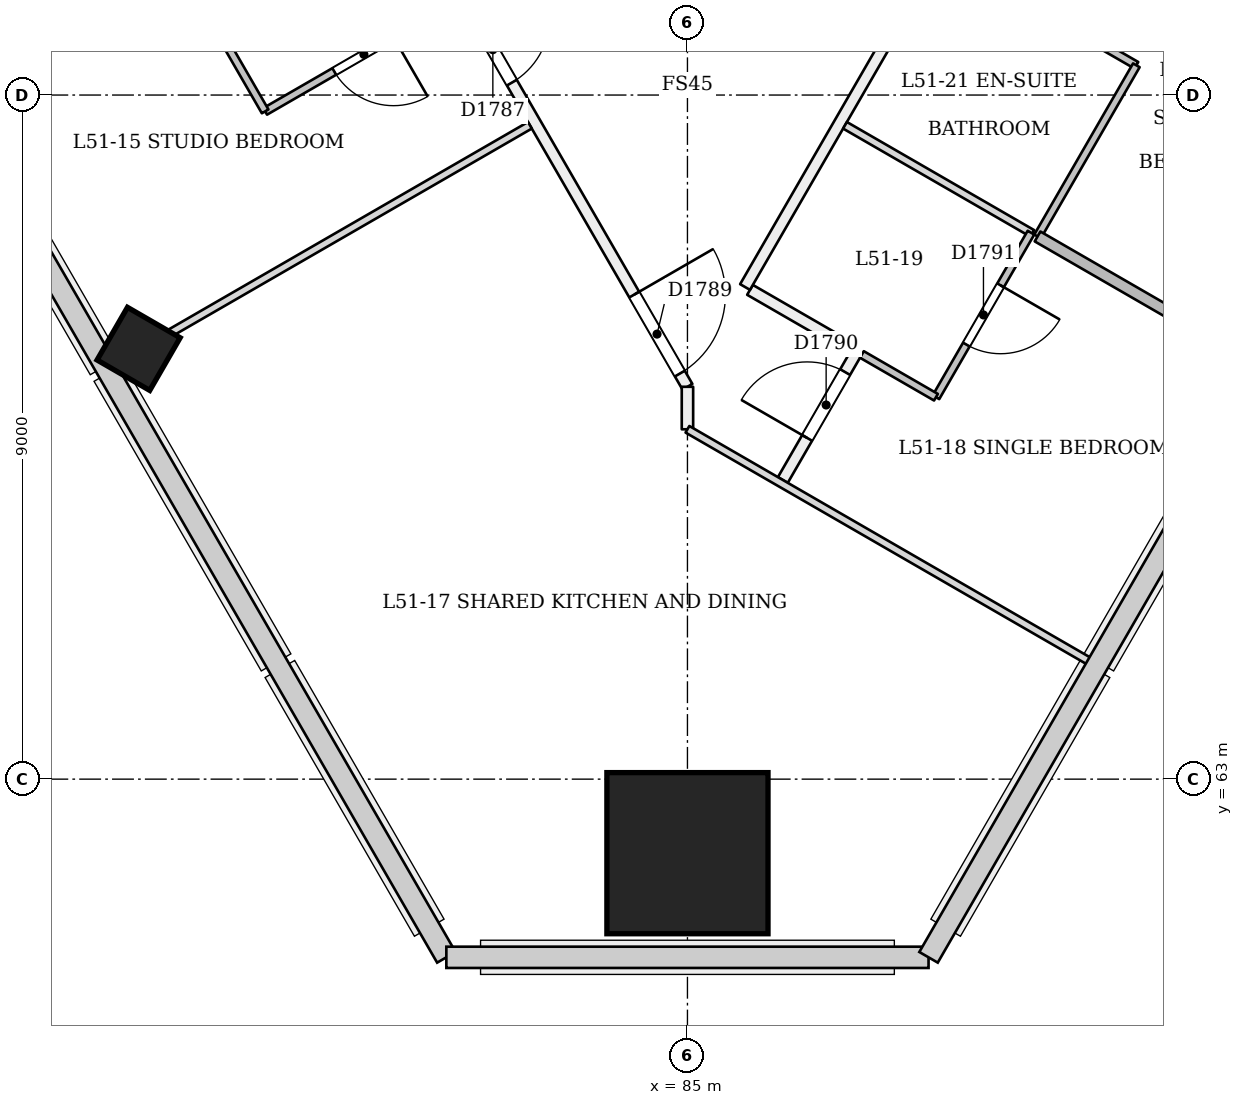
"""IFC4 building model, lengths in metres.
Left out: names, types, materials, properties, quantities, classifications, styles, units other than length and angle.
Written with IfcOpenShell. Run it as: python <this file> out.ifc"""

import sys

from ifc_helpers import new_model, si_unit, direction, frame, frame_2d, origin, origin_2d, place, context, subcontext, project, spatial, rectangle, extrude, element, fill, save


model = new_model("IFC4")
c1 = context("Model", 3, precision=1e-05, world=origin(), true_north=direction((0.0, 1.0)))
c2 = subcontext(c1, "Body", "Model", "MODEL_VIEW")
j1 = project(units=[si_unit("LENGTHUNIT", "METRE"), si_unit("PLANEANGLEUNIT", "RADIAN")], contexts=[c1])
p1 = place(None, origin())
s1 = spatial("IfcSite", under=j1, at=p1, CompositionType="ELEMENT")
p2 = place(p1, origin())
s2 = spatial("IfcBuilding", under=s1, at=p2, CompositionType="ELEMENT")
p3 = place(p2, frame((0.0, 0.0, 198.0)))
s3 = spatial("IfcBuildingStorey", under=s2, at=p3, CompositionType="ELEMENT", Elevation=198.0)
p4 = place(p3, frame((85.0, 61.956, 0.0), z_axis=(0.0, 0.058356907999, 0.998295783467), x_axis=(-1.0, 0.0, 0.0)))
e1 = element("IfcColumn", 1, at=p4, inside=s3, PredefinedType="COLUMN", context=c2, shape_type="SweptSolid", body=[
    extrude(rectangle(XDim=2.12, YDim=2.12, at=origin_2d()), origin(), (0.0, 0.0, 1.0), 3.606),
])
p5 = place(p3, frame((77.752, 68.614, -0.024), z_axis=(0.02215519141, 0.038415882353, 0.999016199807), x_axis=(-0.865361947816, -0.499673614488, 0.038405445666)))
e2 = element("IfcColumn", 2, at=p5, inside=s3, PredefinedType="COLUMN", context=c2, shape_type="SweptSolid", body=[
    extrude(rectangle(XDim=0.8, YDim=0.8, at=origin_2d()), origin(), (0.0, 0.0, 1.0), 3.604),
])
p6 = place(p3, frame((72.276, 90.2, 0.0), z_axis=(0.0, 0.0, 1.0), x_axis=(0.499998171638, -0.866026459387, 0.0)))
e3 = element("IfcWall", 3, at=p6, inside=s3, PredefinedType="PARTITIONING", context=c2, shape_type="SweptSolid", body=[
    extrude(rectangle(XDim=25.447, YDim=0.15, at=frame_2d((12.724, 0.0))), origin(), (0.0, 0.0, 1.0), 2.75),
])
p7 = place(p6, frame((7.332, 0.0, 0.0)))
e4 = element("IfcOpeningElement", 4, at=p7, cuts=e3, PredefinedType="OPENING", context=c2, shape_type="SweptSolid", body=[
    extrude(rectangle(XDim=1.2, YDim=2.1, at=frame_2d((0.6, 1.05))), frame((0.0, 0.085, 0.0), z_axis=(0.0, -1.0, 0.0), x_axis=(1.0, 0.0, 0.0)), (0.0, 0.0, 1.0), 0.171),
])
p8 = place(p6, frame((15.211, 0.0, 0.0)))
e5 = element("IfcOpeningElement", 5, at=p8, cuts=e3, PredefinedType="OPENING", context=c2, shape_type="SweptSolid", body=[
    extrude(rectangle(XDim=1.0, YDim=2.1, at=frame_2d((0.5, 1.05))), frame((0.0, 0.085, 0.0), z_axis=(0.0, -1.0, 0.0), x_axis=(1.0, 0.0, 0.0)), (0.0, 0.0, 1.0), 0.171),
])
p9 = place(p6, frame((19.827, 0.0, 0.0)))
e6 = element("IfcOpeningElement", 6, at=p9, cuts=e3, PredefinedType="OPENING", context=c2, shape_type="SweptSolid", body=[
    extrude(rectangle(XDim=1.0, YDim=2.1, at=frame_2d((0.5, 1.05))), frame((0.0, 0.085, 0.0), z_axis=(0.0, -1.0, 0.0), x_axis=(1.0, 0.0, 0.0)), (0.0, 0.0, 1.0), 0.171),
])
p10 = place(p6, frame((24.047, 0.0, 0.0)))
e7 = element("IfcOpeningElement", 7, at=p10, cuts=e3, PredefinedType="OPENING", context=c2, shape_type="SweptSolid", body=[
    extrude(rectangle(XDim=1.2, YDim=2.1, at=frame_2d((0.6, 1.05))), frame((0.0, 0.085, 0.0), z_axis=(0.0, -1.0, 0.0), x_axis=(1.0, 0.0, 0.0)), (0.0, 0.0, 1.0), 0.171),
])
p11 = place(p3, frame((85.0, 68.162, 0.0), z_axis=(0.0, 0.0, 1.0), x_axis=(0.0, -1.0, 0.0)))
e8 = element("IfcWall", 8, at=p11, inside=s3, PredefinedType="PARTITIONING", context=c2, shape_type="SweptSolid", body=[
    extrude(rectangle(XDim=0.559, YDim=0.15, at=frame_2d((0.28, 0.0))), origin(), (0.0, 0.0, 1.0), 3.15),
])
p12 = place(p3, frame((86.255, 66.936, 0.0), z_axis=(0.0, 0.0, 1.0), x_axis=(0.500043961785, 0.866000020948, 0.0)))
e9 = element("IfcWall", 9, at=p12, inside=s3, PredefinedType="PARTITIONING", context=c2, shape_type="SweptSolid", body=[
    extrude(rectangle(XDim=1.95, YDim=0.15, at=frame_2d((0.975, 0.0))), origin(), (0.0, 0.0, 1.0), 3.15),
])
p13 = place(p12, frame((0.639, 0.0, 0.0)))
e10 = element("IfcOpeningElement", 10, at=p13, cuts=e9, PredefinedType="OPENING", context=c2, shape_type="SweptSolid", body=[
    extrude(rectangle(XDim=1.0, YDim=2.1, at=frame_2d((0.5, 1.05))), frame((0.0, 0.085, 0.0), z_axis=(0.0, -1.0, 0.0), x_axis=(1.0, 0.0, 0.0)), (0.0, 0.0, 1.0), 0.171),
])
p14 = place(p3, frame((87.165, 68.662, 0.0), z_axis=(0.0, 0.0, 1.0), x_axis=(-0.866043940782, 0.499967891604, 0.0)))
e11 = element("IfcWall", 11, at=p14, inside=s3, PredefinedType="PARTITIONING", context=c2, shape_type="SweptSolid", body=[
    extrude(rectangle(XDim=1.55, YDim=0.15, at=frame_2d((0.775, 0.0))), origin(), (0.0, 0.0, 1.0), 3.15),
])
p15 = place(p3, frame((85.758, 69.475, 0.0), z_axis=(0.0, 0.0, 1.0), x_axis=(0.500001211172, 0.866024704513, 0.0)))
e12 = element("IfcWall", 12, at=p15, inside=s3, PredefinedType="PARTITIONING", context=c2, shape_type="SweptSolid", body=[
    extrude(rectangle(XDim=23.932, YDim=0.15, at=frame_2d((11.966, 0.0))), origin(), (0.0, 0.0, 1.0), 2.75),
])
p16 = place(p15, frame((5.395, 0.0, 0.0)))
e13 = element("IfcOpeningElement", 13, at=p16, cuts=e12, PredefinedType="OPENING", context=c2, shape_type="SweptSolid", body=[
    extrude(rectangle(XDim=1.0, YDim=2.1, at=frame_2d((0.5, 1.05))), frame((0.0, 0.085, 0.0), z_axis=(0.0, -1.0, 0.0), x_axis=(1.0, 0.0, 0.0)), (0.0, 0.0, 1.0), 0.171),
])
p17 = place(p15, frame((7.72, 0.0, 0.0)))
e14 = element("IfcOpeningElement", 14, at=p17, cuts=e12, PredefinedType="OPENING", context=c2, shape_type="SweptSolid", body=[
    extrude(rectangle(XDim=1.0, YDim=2.1, at=frame_2d((0.5, 1.05))), frame((0.0, 0.085, 0.0), z_axis=(0.0, -1.0, 0.0), x_axis=(1.0, 0.0, 0.0)), (0.0, 0.0, 1.0), 0.171),
])
p18 = place(p15, frame((14.28, 0.0, 0.0)))
e15 = element("IfcOpeningElement", 15, at=p18, cuts=e12, PredefinedType="OPENING", context=c2, shape_type="SweptSolid", body=[
    extrude(rectangle(XDim=1.0, YDim=2.1, at=frame_2d((0.5, 1.05))), frame((0.0, 0.085, 0.0), z_axis=(0.0, -1.0, 0.0), x_axis=(1.0, 0.0, 0.0)), (0.0, 0.0, 1.0), 0.171),
])
p19 = place(p15, frame((16.605, 0.0, 0.0)))
e16 = element("IfcOpeningElement", 16, at=p19, cuts=e12, PredefinedType="OPENING", context=c2, shape_type="SweptSolid", body=[
    extrude(rectangle(XDim=1.0, YDim=2.1, at=frame_2d((0.5, 1.05))), frame((0.0, 0.085, 0.0), z_axis=(0.0, -1.0, 0.0), x_axis=(1.0, 0.0, 0.0)), (0.0, 0.0, 1.0), 0.171),
])
p20 = place(p3, frame((75.182, 72.327, 0.0), z_axis=(0.0, 0.0, 1.0), x_axis=(0.866038183914, 0.499977863513, 0.0)))
e17 = element("IfcWall", 17, at=p20, inside=s3, PredefinedType="PARTITIONING", context=c2, shape_type="SweptSolid", body=[
    extrude(rectangle(XDim=3.42, YDim=0.15, at=frame_2d((1.71, 0.0))), origin(), (0.0, 0.0, 1.0), 2.65),
])
p21 = place(p3, frame((81.977, 73.248, 0.0), z_axis=(0.0, 0.0, 1.0), x_axis=(-0.866046596414, -0.499963291492, 0.0)))
e18 = element("IfcWall", 18, at=p21, inside=s3, PredefinedType="PARTITIONING", context=c2, shape_type="SweptSolid", body=[
    extrude(rectangle(XDim=2.925, YDim=0.1, at=frame_2d((1.462, 0.0))), origin(), (0.0, 0.0, 1.0), 3.15),
])
p22 = place(p21, frame((0.975, 0.0, 0.0)))
e19 = element("IfcOpeningElement", 19, at=p22, cuts=e18, PredefinedType="OPENING", context=c2, shape_type="SweptSolid", body=[
    extrude(rectangle(XDim=0.9, YDim=2.1, at=frame_2d((0.45, 1.05))), frame((0.0, 0.061, 0.0), z_axis=(0.0, -1.0, 0.0), x_axis=(1.0, 0.0, 0.0)), (0.0, 0.0, 1.0), 0.121),
])
p23 = place(p3, frame((79.444, 71.785, 0.0), z_axis=(0.0, 0.0, 1.0), x_axis=(-0.500047596559, 0.865997922154, 0.0)))
e20 = element("IfcWall", 20, at=p23, inside=s3, PredefinedType="PARTITIONING", context=c2, shape_type="SweptSolid", body=[
    extrude(rectangle(XDim=2.6, YDim=0.1, at=frame_2d((1.3, 0.0))), origin(), (0.0, 0.0, 1.0), 3.15),
])
p24 = place(p3, frame((77.449, 68.44, 0.0), z_axis=(0.0, 0.0, 1.0), x_axis=(0.866042250622, 0.499970819286, 0.0)))
e21 = element("IfcWall", 21, at=p24, inside=s3, PredefinedType="PARTITIONING", context=c2, shape_type="SweptSolid", body=[
    extrude(rectangle(XDim=6.325, YDim=0.1, at=frame_2d((3.163, 0.0))), origin(), (0.0, 0.0, 1.0), 2.65),
])
p25 = place(p3, frame((90.318, 64.532, 0.0), z_axis=(0.0, 0.0, 1.0), x_axis=(-0.866022710561, 0.50000466477, 0.0)))
e22 = element("IfcWall", 22, at=p25, inside=s3, PredefinedType="PARTITIONING", context=c2, shape_type="SweptSolid", body=[
    extrude(rectangle(XDim=6.141, YDim=0.1, at=frame_2d((3.07, 0.0))), origin(), (0.0, 0.0, 1.0), 2.65),
])
p26 = place(p3, frame((89.519, 70.19, 0.0), z_axis=(0.0, 0.0, 1.0), x_axis=(-0.499961950354, -0.866047370643, 0.0)))
e23 = element("IfcWall", 23, at=p26, inside=s3, PredefinedType="PARTITIONING", context=c2, shape_type="SweptSolid", body=[
    extrude(rectangle(XDim=2.5, YDim=0.1, at=frame_2d((1.25, 0.0))), origin(), (0.0, 0.0, 1.0), 3.15),
])
p27 = place(p26, frame((0.8, 0.0, 0.0)))
e24 = element("IfcOpeningElement", 24, at=p27, cuts=e23, PredefinedType="OPENING", context=c2, shape_type="SweptSolid", body=[
    extrude(rectangle(XDim=0.9, YDim=2.1, at=frame_2d((0.45, 1.05))), frame((0.0, 0.061, 0.0), z_axis=(0.0, -1.0, 0.0), x_axis=(1.0, 0.0, 0.0)), (0.0, 0.0, 1.0), 0.121),
])
p28 = place(p3, frame((88.269, 68.024, 0.0), z_axis=(0.0, 0.0, 1.0), x_axis=(-0.86599040064, 0.500060622324, 0.0)))
e25 = element("IfcWall", 25, at=p28, inside=s3, PredefinedType="PARTITIONING", context=c2, shape_type="SweptSolid", body=[
    extrude(rectangle(XDim=1.125, YDim=0.1, at=frame_2d((0.562, 0.0))), origin(), (0.0, 0.0, 1.0), 3.15),
])
p29 = place(p3, frame((92.551, 68.44, 0.0), z_axis=(0.0, 0.0, 1.0), x_axis=(-0.866038511948, 0.499977295307, 0.0)))
e26 = element("IfcWall", 26, at=p29, inside=s3, PredefinedType="PARTITIONING", context=c2, shape_type="SweptSolid", body=[
    extrude(rectangle(XDim=3.4, YDim=0.15, at=frame_2d((1.7, 0.0))), origin(), (0.0, 0.0, 1.0), 2.65),
])
p30 = place(p3, frame((89.537, 70.18, 0.0), z_axis=(0.0, 0.0, 1.0), x_axis=(-0.866048401274, 0.499960165064, 0.0)))
e27 = element("IfcWall", 27, at=p30, inside=s3, PredefinedType="PARTITIONING", context=c2, shape_type="SweptSolid", body=[
    extrude(rectangle(XDim=2.845, YDim=0.1, at=frame_2d((1.422, 0.0))), origin(), (0.0, 0.0, 1.0), 3.15),
])
p31 = place(p3, frame((88.373, 73.854, 0.0), z_axis=(0.0, 0.0, 1.0), x_axis=(0.866046596414, -0.499963291492, 0.0)))
e28 = element("IfcWall", 28, at=p31, inside=s3, PredefinedType="PARTITIONING", context=c2, shape_type="SweptSolid", body=[
    extrude(rectangle(XDim=2.925, YDim=0.1, at=frame_2d((1.462, 0.0))), origin(), (0.0, 0.0, 1.0), 3.15),
])
p32 = place(p31, frame((0.975, 0.0, 0.0)))
e29 = element("IfcOpeningElement", 29, at=p32, cuts=e28, PredefinedType="OPENING", context=c2, shape_type="SweptSolid", body=[
    extrude(rectangle(XDim=0.9, YDim=2.1, at=frame_2d((0.45, 1.05))), frame((0.0, 0.061, 0.0), z_axis=(0.0, -1.0, 0.0), x_axis=(1.0, 0.0, 0.0)), (0.0, 0.0, 1.0), 0.121),
])
p33 = place(p3, frame((90.906, 72.391, 0.0), z_axis=(0.0, 0.0, 1.0), x_axis=(-0.500006934395, -0.866021400173, 0.0)))
e30 = element("IfcWall", 30, at=p33, inside=s3, PredefinedType="PARTITIONING", context=c2, shape_type="SweptSolid", body=[
    extrude(rectangle(XDim=2.6, YDim=0.1, at=frame_2d((1.3, 0.0))), origin(), (0.0, 0.0, 1.0), 3.15),
])
p34 = place(p3, frame((94.818, 72.327, 0.0), z_axis=(0.0, 0.0, 1.0), x_axis=(-0.866025401434, 0.500000004071, 0.0)))
e31 = element("IfcWall", 31, at=p34, inside=s3, PredefinedType="PARTITIONING", context=c2, shape_type="SweptSolid", body=[
    extrude(rectangle(XDim=6.345, YDim=0.15, at=frame_2d((3.173, 0.0))), origin(), (0.0, 0.0, 1.0), 2.65),
])
p35 = place(p9, origin())
e32 = element("IfcDoor", 32, at=p35, inside=s3, OperationType="SINGLE_SWING_LEFT", PredefinedType="NOTDEFINED", context=c2, shape_type="SweptSolid", body=[
    extrude(rectangle(XDim=1.0, YDim=2.1, at=frame_2d((0.5, 1.05))), frame((0.0, 0.025, 0.0), z_axis=(0.0, -1.0, 0.0), x_axis=(1.0, 0.0, 0.0)), (0.0, 0.0, 1.0), 0.05),
])
fill(e6, e32)
p36 = place(p22, origin())
e33 = element("IfcDoor", 33, at=p36, inside=s3, OperationType="SINGLE_SWING_LEFT", PredefinedType="NOTDEFINED", context=c2, shape_type="SweptSolid", body=[
    extrude(rectangle(XDim=0.9, YDim=2.1, at=frame_2d((0.45, 1.05))), frame((0.0, 0.025, 0.0), z_axis=(0.0, -1.0, 0.0), x_axis=(1.0, 0.0, 0.0)), (0.0, 0.0, 1.0), 0.05),
])
fill(e19, e33)
p37 = place(p10, origin())
e34 = element("IfcDoor", 34, at=p37, inside=s3, OperationType="SINGLE_SWING_LEFT", PredefinedType="NOTDEFINED", context=c2, shape_type="SweptSolid", body=[
    extrude(rectangle(XDim=1.2, YDim=2.1, at=frame_2d((0.6, 1.05))), frame((0.0, 0.025, 0.0), z_axis=(0.0, -1.0, 0.0), x_axis=(1.0, 0.0, 0.0)), (0.0, 0.0, 1.0), 0.05),
])
fill(e7, e34)
p38 = place(p13, origin())
e35 = element("IfcDoor", 35, at=p38, inside=s3, OperationType="SINGLE_SWING_LEFT", PredefinedType="NOTDEFINED", context=c2, shape_type="SweptSolid", body=[
    extrude(rectangle(XDim=1.0, YDim=2.1, at=frame_2d((0.5, 1.05))), frame((0.0, 0.025, 0.0), z_axis=(0.0, -1.0, 0.0), x_axis=(1.0, 0.0, 0.0)), (0.0, 0.0, 1.0), 0.05),
])
fill(e10, e35)
p39 = place(p27, origin())
e36 = element("IfcDoor", 36, at=p39, inside=s3, OperationType="SINGLE_SWING_LEFT", PredefinedType="NOTDEFINED", context=c2, shape_type="SweptSolid", body=[
    extrude(rectangle(XDim=0.9, YDim=2.1, at=frame_2d((0.45, 1.05))), frame((0.0, 0.025, 0.0), z_axis=(0.0, -1.0, 0.0), x_axis=(1.0, 0.0, 0.0)), (0.0, 0.0, 1.0), 0.05),
])
fill(e24, e36)
save(model, sys.argv[1])
